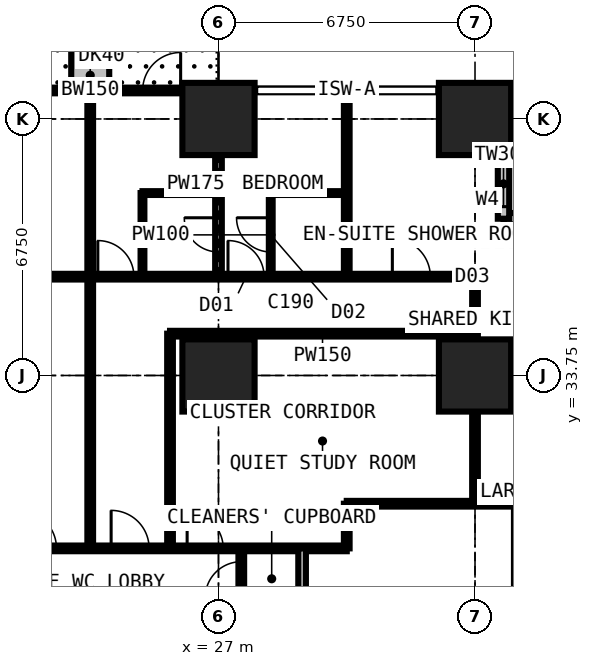
"""IFC4 building model, lengths in metres.
Left out: names, types, materials, properties, quantities, classifications, styles, units other than length and angle.
Written with IfcOpenShell. Run it as: python <this file> out.ifc"""

import sys

from ifc_helpers import new_model, si_unit, direction, frame, frame_2d, origin, origin_2d, place, context, subcontext, project, spatial, rectangle, extrude, element, fill, save


model = new_model("IFC4")
c1 = context("Model", 3, precision=1e-05, world=origin(), true_north=direction((0.0, 1.0)))
c2 = subcontext(c1, "Body", "Model", "MODEL_VIEW")
j1 = project(units=[si_unit("LENGTHUNIT", "METRE"), si_unit("PLANEANGLEUNIT", "RADIAN")], contexts=[c1])
p1 = place(None, origin())
s1 = spatial("IfcSite", under=j1, at=p1, CompositionType="ELEMENT")
p2 = place(p1, origin())
s2 = spatial("IfcBuilding", under=s1, at=p2, CompositionType="ELEMENT")
p3 = place(p2, frame((0.0, 0.0, 43.2)))
s3 = spatial("IfcBuildingStorey", under=s2, at=p3, CompositionType="ELEMENT", Elevation=43.2)
for number, where, z_axis, x_axis in (
    (1, (27.0, 33.75, 0.0), (0.0, 0.0, 1.0), (1.0, 0.0, 0.0)),
    (2, (27.0, 40.5, 0.0), (0.0, 0.0, 1.0), (1.0, 0.0, 0.0)),
    (3, (33.75, 33.75, 0.0), (0.0, 0.0, 1.0), (1.0, 0.0, 0.0)),
    (4, (33.75, 40.5, 0.0), (0.0, 0.0, 1.0), (1.0, 0.0, 0.0)),
):
    element("IfcColumn", number, at=place(p3, frame(where, z_axis=z_axis, x_axis=x_axis)), inside=s3, PredefinedType="COLUMN", context=c2, shape_type="SweptSolid", body=[
        extrude(rectangle(XDim=1.9, YDim=1.9, at=origin_2d()), origin(), (0.0, 0.0, 1.0), 3.6),
    ])
p4 = place(p3, frame((37.875, 37.875, 0.0), z_axis=(0.0, 0.0, 1.0), x_axis=(-1.0, 0.0, 0.0)))
e5 = element("IfcWall", 5, at=p4, inside=s3, PredefinedType="SOLIDWALL", context=c2, shape_type="SweptSolid", body=[
    extrude(rectangle(XDim=3.375, YDim=0.3, at=frame_2d((1.688, 0.0))), origin(), (0.0, 0.0, 1.0), 3.375),
])
p5 = place(p4, frame((0.788, 0.0, 0.6)))
e6 = element("IfcOpeningElement", 6, at=p5, cuts=e5, PredefinedType="OPENING", context=c2, shape_type="SweptSolid", body=[
    extrude(rectangle(XDim=1.8, YDim=2.1, at=frame_2d((0.9, 1.05))), frame((0.0, 0.16, 0.0), z_axis=(0.0, -1.0, 0.0), x_axis=(1.0, 0.0, 0.0)), (0.0, 0.0, 1.0), 0.32),
])
p6 = place(p3, frame((34.5, 37.875, 0.0), z_axis=(0.0, 0.0, 1.0), x_axis=(0.0, 1.0, 0.0)))
e7 = element("IfcWall", 7, at=p6, inside=s3, PredefinedType="SOLIDWALL", context=c2, shape_type="SweptSolid", body=[
    extrude(rectangle(XDim=3.375, YDim=0.3, at=frame_2d((1.688, 0.0))), origin(), (0.0, 0.0, 1.0), 3.375),
])
p7 = place(p6, frame((0.317, 0.0, 0.9)))
e8 = element("IfcOpeningElement", 8, at=p7, cuts=e7, PredefinedType="OPENING", context=c2, shape_type="SweptSolid", body=[
    extrude(rectangle(XDim=1.2, YDim=1.8, at=frame_2d((0.6, 0.9))), frame((0.0, 0.16, 0.0), z_axis=(0.0, -1.0, 0.0), x_axis=(1.0, 0.0, 0.0)), (0.0, 0.0, 1.0), 0.32),
])
p8 = place(p3, frame((20.25, 41.25, 0.0), z_axis=(0.0, 0.0, 1.0), x_axis=(1.0, 0.0, 0.0)))
e9 = element("IfcWall", 9, at=p8, inside=s3, PredefinedType="SOLIDWALL", context=c2, shape_type="SweptSolid", body=[
    extrude(rectangle(XDim=6.75, YDim=0.15, at=frame_2d((3.375, 0.0))), origin(), (0.0, 0.0, 1.0), 3.375),
])
p9 = place(p8, frame((0.996, 0.0, 0.0)))
e10 = element("IfcOpeningElement", 10, at=p9, cuts=e9, PredefinedType="OPENING", context=c2, shape_type="SweptSolid", body=[
    extrude(rectangle(XDim=1.0, YDim=2.2, at=frame_2d((0.5, 1.1))), frame((0.0, 0.085, 0.0), z_axis=(0.0, -1.0, 0.0), x_axis=(1.0, 0.0, 0.0)), (0.0, 0.0, 1.0), 0.17),
])
p10 = place(p8, frame((2.042, 0.0, 0.9)))
e11 = element("IfcOpeningElement", 11, at=p10, cuts=e9, PredefinedType="OPENING", context=c2, shape_type="SweptSolid", body=[
    extrude(rectangle(XDim=1.2, YDim=1.8, at=frame_2d((0.6, 0.9))), frame((0.0, 0.085, 0.0), z_axis=(0.0, -1.0, 0.0), x_axis=(1.0, 0.0, 0.0)), (0.0, 0.0, 1.0), 0.17),
])
p11 = place(p8, frame((4.754, 0.0, 0.0)))
e12 = element("IfcOpeningElement", 12, at=p11, cuts=e9, PredefinedType="OPENING", context=c2, shape_type="SweptSolid", body=[
    extrude(rectangle(XDim=1.0, YDim=2.2, at=frame_2d((0.5, 1.1))), frame((0.0, 0.085, 0.0), z_axis=(0.0, -1.0, 0.0), x_axis=(1.0, 0.0, 0.0)), (0.0, 0.0, 1.0), 0.17),
])
p12 = place(p8, frame((3.508, 0.0, 0.9)))
e13 = element("IfcOpeningElement", 13, at=p12, cuts=e9, PredefinedType="OPENING", context=c2, shape_type="SweptSolid", body=[
    extrude(rectangle(XDim=1.2, YDim=1.8, at=frame_2d((0.6, 0.9))), frame((0.0, 0.085, 0.0), z_axis=(0.0, -1.0, 0.0), x_axis=(1.0, 0.0, 0.0)), (0.0, 0.0, 1.0), 0.17),
])
p13 = place(p3, frame((23.625, 41.35, 0.0), z_axis=(0.0, 0.0, 1.0), x_axis=(0.0, 1.0, 0.0)))
e14 = element("IfcWall", 14, at=p13, inside=s3, PredefinedType="USERDEFINED", context=c2, shape_type="SweptSolid", body=[
    extrude(rectangle(XDim=2.2, YDim=1.0, at=frame_2d((1.1, 0.0))), origin(), (0.0, 0.0, 1.0), 0.9),
])
p14 = place(p3, frame((10.125, 36.35, 0.0), z_axis=(0.0, 0.0, 1.0), x_axis=(1.0, 0.0, 0.0)))
e15 = element("IfcWall", 15, at=p14, inside=s3, PredefinedType="PARTITIONING", context=c2, shape_type="SweptSolid", body=[
    extrude(rectangle(XDim=23.625, YDim=0.15, at=frame_2d((11.812, 0.0))), origin(), (0.0, 0.0, 1.0), 3.375),
])
p15 = place(p14, frame((21.45, 0.0, 0.0)))
e16 = element("IfcOpeningElement", 16, at=p15, cuts=e15, PredefinedType="OPENING", context=c2, shape_type="SweptSolid", body=[
    extrude(rectangle(XDim=1.0, YDim=2.2, at=frame_2d((0.5, 1.1))), frame((0.0, 0.085, 0.0), z_axis=(0.0, -1.0, 0.0), x_axis=(1.0, 0.0, 0.0)), (0.0, 0.0, 1.0), 0.17),
])
p16 = place(p14, frame((17.125, 0.0, 0.0)))
e17 = element("IfcOpeningElement", 17, at=p16, cuts=e15, PredefinedType="OPENING", context=c2, shape_type="SweptSolid", body=[
    extrude(rectangle(XDim=0.95, YDim=2.2, at=frame_2d((0.475, 1.1))), frame((0.0, 0.085, 0.0), z_axis=(0.0, -1.0, 0.0), x_axis=(1.0, 0.0, 0.0)), (0.0, 0.0, 1.0), 0.17),
])
p17 = place(p14, frame((13.7, 0.0, 0.0)))
e18 = element("IfcOpeningElement", 18, at=p17, cuts=e15, PredefinedType="OPENING", context=c2, shape_type="SweptSolid", body=[
    extrude(rectangle(XDim=0.95, YDim=2.2, at=frame_2d((0.475, 1.1))), frame((0.0, 0.085, 0.0), z_axis=(0.0, -1.0, 0.0), x_axis=(1.0, 0.0, 0.0)), (0.0, 0.0, 1.0), 0.17),
])
p18 = place(p14, frame((4.2, 0.0, 0.0)))
e19 = element("IfcOpeningElement", 19, at=p18, cuts=e15, PredefinedType="OPENING", context=c2, shape_type="SweptSolid", body=[
    extrude(rectangle(XDim=0.95, YDim=2.2, at=frame_2d((0.475, 1.1))), frame((0.0, 0.085, 0.0), z_axis=(0.0, -1.0, 0.0), x_axis=(1.0, 0.0, 0.0)), (0.0, 0.0, 1.0), 0.17),
])
p19 = place(p14, frame((10.95, 0.0, 0.0)))
e20 = element("IfcOpeningElement", 20, at=p19, cuts=e15, PredefinedType="OPENING", context=c2, shape_type="SweptSolid", body=[
    extrude(rectangle(XDim=0.95, YDim=2.2, at=frame_2d((0.475, 1.1))), frame((0.0, 0.085, 0.0), z_axis=(0.0, -1.0, 0.0), x_axis=(1.0, 0.0, 0.0)), (0.0, 0.0, 1.0), 0.17),
])
p20 = place(p3, frame((11.3, 29.2, 0.0), z_axis=(0.0, 0.0, 1.0), x_axis=(1.0, 0.0, 0.0)))
e21 = element("IfcWall", 21, at=p20, inside=s3, PredefinedType="PARTITIONING", context=c2, shape_type="SweptSolid", body=[
    extrude(rectangle(XDim=19.075, YDim=0.15, at=frame_2d((9.538, 0.0))), origin(), (0.0, 0.0, 1.0), 3.375),
])
p21 = place(p20, frame((12.875, 0.0, 0.0)))
e22 = element("IfcOpeningElement", 22, at=p21, cuts=e21, PredefinedType="OPENING", context=c2, shape_type="SweptSolid", body=[
    extrude(rectangle(XDim=1.0, YDim=2.2, at=frame_2d((0.5, 1.1))), frame((0.0, 0.085, 0.0), z_axis=(0.0, -1.0, 0.0), x_axis=(1.0, 0.0, 0.0)), (0.0, 0.0, 1.0), 0.17),
])
p22 = place(p20, frame((10.438, 0.0, 0.0)))
e23 = element("IfcOpeningElement", 23, at=p22, cuts=e21, PredefinedType="OPENING", context=c2, shape_type="SweptSolid", body=[
    extrude(rectangle(XDim=1.0, YDim=2.2, at=frame_2d((0.5, 1.1))), frame((0.0, 0.085, 0.0), z_axis=(0.0, -1.0, 0.0), x_axis=(1.0, 0.0, 0.0)), (0.0, 0.0, 1.0), 0.17),
])
p23 = place(p20, frame((14.875, 0.0, 0.0)))
e24 = element("IfcOpeningElement", 24, at=p23, cuts=e21, PredefinedType="OPENING", context=c2, shape_type="SweptSolid", body=[
    extrude(rectangle(XDim=0.95, YDim=2.2, at=frame_2d((0.475, 1.1))), frame((0.0, 0.085, 0.0), z_axis=(0.0, -1.0, 0.0), x_axis=(1.0, 0.0, 0.0)), (0.0, 0.0, 1.0), 0.17),
])
p24 = place(p3, frame((23.625, 29.2, 0.0), z_axis=(0.0, 0.0, 1.0), x_axis=(0.0, 1.0, 0.0)))
e25 = element("IfcWall", 25, at=p24, inside=s3, PredefinedType="PARTITIONING", context=c2, shape_type="SweptSolid", body=[
    extrude(rectangle(XDim=12.034, YDim=0.15, at=frame_2d((6.017, 0.0))), origin(), (0.0, 0.0, 1.0), 3.375),
])
p25 = place(p3, frame((25.0, 36.35, 0.0), z_axis=(0.0, 0.0, 1.0), x_axis=(0.0, 1.0, 0.0)))
e26 = element("IfcWall", 26, at=p25, inside=s3, PredefinedType="PARTITIONING", context=c2, shape_type="SweptSolid", body=[
    extrude(rectangle(XDim=2.2, YDim=0.1, at=frame_2d((1.1, 0.0))), origin(), (0.0, 0.0, 1.0), 3.375),
])
p26 = place(p3, frame((25.0, 38.55, 0.0), z_axis=(0.0, 0.0, 1.0), x_axis=(1.0, 0.0, 0.0)))
e27 = element("IfcWall", 27, at=p26, inside=s3, PredefinedType="PARTITIONING", context=c2, shape_type="SweptSolid", body=[
    extrude(rectangle(XDim=2.0, YDim=0.1, at=frame_2d((1.0, 0.0))), origin(), (0.0, 0.0, 1.0), 3.375),
])
p27 = place(p3, frame((25.725, 29.2, 0.0), z_axis=(0.0, 0.0, 1.0), x_axis=(0.0, 1.0, 0.0)))
e28 = element("IfcWall", 28, at=p27, inside=s3, PredefinedType="PARTITIONING", context=c2, shape_type="SweptSolid", body=[
    extrude(rectangle(XDim=5.65, YDim=0.15, at=frame_2d((2.825, 0.0))), origin(), (0.0, 0.0, 1.0), 3.375),
])
p28 = place(p3, frame((25.725, 34.85, 0.0), z_axis=(0.0, 0.0, 1.0), x_axis=(1.0, 0.0, 0.0)))
e29 = element("IfcWall", 29, at=p28, inside=s3, PredefinedType="PARTITIONING", context=c2, shape_type="SweptSolid", body=[
    extrude(rectangle(XDim=8.025, YDim=0.15, at=frame_2d((4.012, 0.0))), origin(), (0.0, 0.0, 1.0), 3.375),
])
p29 = place(p3, frame((27.0, 36.35, 0.0), z_axis=(0.0, 0.0, 1.0), x_axis=(0.0, 1.0, 0.0)))
e30 = element("IfcWall", 30, at=p29, inside=s3, PredefinedType="PARTITIONING", context=c2, shape_type="SweptSolid", body=[
    extrude(rectangle(XDim=4.884, YDim=0.175, at=frame_2d((2.442, 0.0))), origin(), (0.0, 0.0, 1.0), 2.61),
])
p30 = place(p29, frame((0.65, 0.0, 0.0)))
e31 = element("IfcOpeningElement", 31, at=p30, cuts=e30, PredefinedType="OPENING", context=c2, shape_type="SweptSolid", body=[
    extrude(rectangle(XDim=0.9, YDim=2.2, at=frame_2d((0.45, 1.1))), frame((0.0, 0.097, 0.0), z_axis=(0.0, -1.0, 0.0), x_axis=(1.0, 0.0, 0.0)), (0.0, 0.0, 1.0), 0.195),
])
p31 = place(p3, frame((27.6, 27.6, 0.0), z_axis=(0.0, 0.0, 1.0), x_axis=(0.0, 1.0, 0.0)))
e32 = element("IfcWall", 32, at=p31, inside=s3, PredefinedType="PARTITIONING", context=c2, shape_type="SweptSolid", body=[
    extrude(rectangle(XDim=1.6, YDim=0.15, at=frame_2d((0.8, 0.0))), origin(), (0.0, 0.0, 1.0), 3.375),
])
p32 = place(p31, frame((0.3, 0.0, 0.0)))
e33 = element("IfcOpeningElement", 33, at=p32, cuts=e32, PredefinedType="OPENING", context=c2, shape_type="SweptSolid", body=[
    extrude(rectangle(XDim=0.95, YDim=2.2, at=frame_2d((0.475, 1.1))), frame((0.0, 0.085, 0.0), z_axis=(0.0, -1.0, 0.0), x_axis=(1.0, 0.0, 0.0)), (0.0, 0.0, 1.0), 0.17),
])
p33 = place(p3, frame((28.375, 36.35, 0.0), z_axis=(0.0, 0.0, 1.0), x_axis=(0.0, 1.0, 0.0)))
e34 = element("IfcWall", 34, at=p33, inside=s3, PredefinedType="PARTITIONING", context=c2, shape_type="SweptSolid", body=[
    extrude(rectangle(XDim=2.2, YDim=0.1, at=frame_2d((1.1, 0.0))), origin(), (0.0, 0.0, 1.0), 3.375),
])
p34 = place(p33, frame((0.65, 0.0, 0.0)))
e35 = element("IfcOpeningElement", 35, at=p34, cuts=e34, PredefinedType="OPENING", context=c2, shape_type="SweptSolid", body=[
    extrude(rectangle(XDim=0.9, YDim=2.2, at=frame_2d((0.45, 1.1))), frame((0.0, 0.06, 0.0), z_axis=(0.0, -1.0, 0.0), x_axis=(1.0, 0.0, 0.0)), (0.0, 0.0, 1.0), 0.12),
])
p35 = place(p3, frame((28.375, 38.55, 0.0), z_axis=(0.0, 0.0, 1.0), x_axis=(1.0, 0.0, 0.0)))
e36 = element("IfcWall", 36, at=p35, inside=s3, PredefinedType="PARTITIONING", context=c2, shape_type="SweptSolid", body=[
    extrude(rectangle(XDim=2.0, YDim=0.1, at=frame_2d((1.0, 0.0))), origin(), (0.0, 0.0, 1.0), 3.375),
])
p36 = place(p3, frame((29.2, 11.3, 0.0), z_axis=(0.0, 0.0, 1.0), x_axis=(0.0, 1.0, 0.0)))
e37 = element("IfcWall", 37, at=p36, inside=s3, PredefinedType="PARTITIONING", context=c2, shape_type="SweptSolid", body=[
    extrude(rectangle(XDim=17.9, YDim=0.2, at=frame_2d((8.95, 0.0))), origin(), (0.0, 0.0, 1.0), 3.375),
])
p37 = place(p36, frame((8.35, 0.0, 0.0)))
e38 = element("IfcOpeningElement", 38, at=p37, cuts=e37, PredefinedType="OPENING", context=c2, shape_type="SweptSolid", body=[
    extrude(rectangle(XDim=1.2, YDim=2.2, at=frame_2d((0.6, 1.1))), frame((0.0, 0.11, 0.0), z_axis=(0.0, -1.0, 0.0), x_axis=(1.0, 0.0, 0.0)), (0.0, 0.0, 1.0), 0.22),
])
p38 = place(p3, frame((30.375, 29.2, 0.0), z_axis=(0.0, 0.0, 1.0), x_axis=(0.0, 1.0, 0.0)))
e39 = element("IfcWall", 39, at=p38, inside=s3, PredefinedType="PARTITIONING", context=c2, shape_type="SweptSolid", body=[
    extrude(rectangle(XDim=1.175, YDim=0.15, at=frame_2d((0.587, 0.0))), origin(), (0.0, 0.0, 1.0), 3.375),
])
p39 = place(p3, frame((30.375, 30.375, 0.0), z_axis=(0.0, 0.0, 1.0), x_axis=(1.0, 0.0, 0.0)))
e40 = element("IfcWall", 40, at=p39, inside=s3, PredefinedType="PARTITIONING", context=c2, shape_type="SweptSolid", body=[
    extrude(rectangle(XDim=10.859, YDim=0.15, at=frame_2d((5.429, 0.0))), origin(), (0.0, 0.0, 1.0), 3.375),
])
p40 = place(p3, frame((30.375, 36.35, 0.0), z_axis=(0.0, 0.0, 1.0), x_axis=(0.0, 1.0, 0.0)))
e41 = element("IfcWall", 41, at=p40, inside=s3, PredefinedType="PARTITIONING", context=c2, shape_type="SweptSolid", body=[
    extrude(rectangle(XDim=4.884, YDim=0.15, at=frame_2d((2.442, 0.0))), origin(), (0.0, 0.0, 1.0), 3.375),
])
p41 = place(p3, frame((33.75, 30.375, 0.0), z_axis=(0.0, 0.0, 1.0), x_axis=(0.0, 1.0, 0.0)))
e42 = element("IfcWall", 42, at=p41, inside=s3, PredefinedType="PARTITIONING", context=c2, shape_type="SweptSolid", body=[
    extrude(rectangle(XDim=5.975, YDim=0.15, at=frame_2d((2.988, 0.0))), origin(), (0.0, 0.0, 1.0), 2.877),
])
p42 = place(p7, origin())
e43 = element("IfcWindow", 43, at=p42, inside=s3, PartitioningType="SINGLE_PANEL", PredefinedType="WINDOW", context=c2, shape_type="SweptSolid", body=[
    extrude(rectangle(XDim=1.2, YDim=1.8, at=frame_2d((0.6, 0.9))), frame((0.0, 0.03, 0.0), z_axis=(0.0, -1.0, 0.0), x_axis=(1.0, 0.0, 0.0)), (0.0, 0.0, 1.0), 0.06),
])
fill(e8, e43)
p43 = place(p10, origin())
e44 = element("IfcWindow", 44, at=p43, inside=s3, PartitioningType="SINGLE_PANEL", PredefinedType="WINDOW", context=c2, shape_type="SweptSolid", body=[
    extrude(rectangle(XDim=1.2, YDim=1.8, at=frame_2d((0.6, 0.9))), frame((0.0, 0.03, 0.0), z_axis=(0.0, -1.0, 0.0), x_axis=(1.0, 0.0, 0.0)), (0.0, 0.0, 1.0), 0.06),
])
fill(e11, e44)
p44 = place(p11, origin())
e45 = element("IfcDoor", 45, at=p44, inside=s3, OperationType="SINGLE_SWING_RIGHT", PredefinedType="DOOR", context=c2, shape_type="SweptSolid", body=[
    extrude(rectangle(XDim=1.0, YDim=2.2, at=frame_2d((0.5, 1.1))), frame((0.0, 0.025, 0.0), z_axis=(0.0, -1.0, 0.0), x_axis=(1.0, 0.0, 0.0)), (0.0, 0.0, 1.0), 0.05),
])
fill(e12, e45)
p45 = place(p12, origin())
e46 = element("IfcWindow", 46, at=p45, inside=s3, PartitioningType="SINGLE_PANEL", PredefinedType="WINDOW", context=c2, shape_type="SweptSolid", body=[
    extrude(rectangle(XDim=1.2, YDim=1.8, at=frame_2d((0.6, 0.9))), frame((0.0, 0.03, 0.0), z_axis=(0.0, -1.0, 0.0), x_axis=(1.0, 0.0, 0.0)), (0.0, 0.0, 1.0), 0.06),
])
fill(e13, e46)
p46 = place(p32, origin())
e47 = element("IfcDoor", 47, at=p46, inside=s3, OperationType="SINGLE_SWING_LEFT", PredefinedType="DOOR", context=c2, shape_type="SweptSolid", body=[
    extrude(rectangle(XDim=0.95, YDim=2.2, at=frame_2d((0.475, 1.1))), frame((0.0, 0.025, 0.0), z_axis=(0.0, -1.0, 0.0), x_axis=(1.0, 0.0, 0.0)), (0.0, 0.0, 1.0), 0.05),
])
fill(e33, e47)
p47 = place(p15, origin())
e48 = element("IfcDoor", 48, at=p47, inside=s3, OperationType="SINGLE_SWING_LEFT", PredefinedType="DOOR", context=c2, shape_type="SweptSolid", body=[
    extrude(rectangle(XDim=1.0, YDim=2.2, at=frame_2d((0.5, 1.1))), frame((0.0, 0.025, 0.0), z_axis=(0.0, -1.0, 0.0), x_axis=(1.0, 0.0, 0.0)), (0.0, 0.0, 1.0), 0.05),
])
fill(e16, e48)
p48 = place(p16, origin())
e49 = element("IfcDoor", 49, at=p48, inside=s3, OperationType="SINGLE_SWING_LEFT", PredefinedType="DOOR", context=c2, shape_type="SweptSolid", body=[
    extrude(rectangle(XDim=0.95, YDim=2.2, at=frame_2d((0.475, 1.1))), frame((0.0, 0.025, 0.0), z_axis=(0.0, -1.0, 0.0), x_axis=(1.0, 0.0, 0.0)), (0.0, 0.0, 1.0), 0.05),
])
fill(e17, e49)
p49 = place(p34, origin())
e50 = element("IfcDoor", 50, at=p49, inside=s3, OperationType="SINGLE_SWING_RIGHT", PredefinedType="DOOR", context=c2, shape_type="SweptSolid", body=[
    extrude(rectangle(XDim=0.9, YDim=2.2, at=frame_2d((0.45, 1.1))), frame((0.0, 0.025, 0.0), z_axis=(0.0, -1.0, 0.0), x_axis=(1.0, 0.0, 0.0)), (0.0, 0.0, 1.0), 0.05),
])
fill(e35, e50)
p50 = place(p17, origin())
e51 = element("IfcDoor", 51, at=p50, inside=s3, OperationType="SINGLE_SWING_LEFT", PredefinedType="DOOR", context=c2, shape_type="SweptSolid", body=[
    extrude(rectangle(XDim=0.95, YDim=2.2, at=frame_2d((0.475, 1.1))), frame((0.0, 0.025, 0.0), z_axis=(0.0, -1.0, 0.0), x_axis=(1.0, 0.0, 0.0)), (0.0, 0.0, 1.0), 0.05),
])
fill(e18, e51)
p51 = place(p30, origin())
e52 = element("IfcDoor", 52, at=p51, inside=s3, OperationType="SINGLE_SWING_RIGHT", PredefinedType="DOOR", context=c2, shape_type="SweptSolid", body=[
    extrude(rectangle(XDim=0.9, YDim=2.2, at=frame_2d((0.45, 1.1))), frame((0.0, 0.025, 0.0), z_axis=(0.0, -1.0, 0.0), x_axis=(1.0, 0.0, 0.0)), (0.0, 0.0, 1.0), 0.05),
])
fill(e31, e52)
p52 = place(p21, origin())
e53 = element("IfcDoor", 53, at=p52, inside=s3, OperationType="SINGLE_SWING_LEFT", PredefinedType="DOOR", context=c2, shape_type="SweptSolid", body=[
    extrude(rectangle(XDim=1.0, YDim=2.2, at=frame_2d((0.5, 1.1))), frame((0.0, 0.025, 0.0), z_axis=(0.0, -1.0, 0.0), x_axis=(1.0, 0.0, 0.0)), (0.0, 0.0, 1.0), 0.05),
])
fill(e22, e53)
p53 = place(p22, origin())
e54 = element("IfcDoor", 54, at=p53, inside=s3, OperationType="SINGLE_SWING_LEFT", PredefinedType="DOOR", context=c2, shape_type="SweptSolid", body=[
    extrude(rectangle(XDim=1.0, YDim=2.2, at=frame_2d((0.5, 1.1))), frame((0.0, 0.025, 0.0), z_axis=(0.0, -1.0, 0.0), x_axis=(1.0, 0.0, 0.0)), (0.0, 0.0, 1.0), 0.05),
])
fill(e23, e54)
p54 = place(p23, origin())
e55 = element("IfcDoor", 55, at=p54, inside=s3, OperationType="SINGLE_SWING_LEFT", PredefinedType="DOOR", context=c2, shape_type="SweptSolid", body=[
    extrude(rectangle(XDim=0.95, YDim=2.2, at=frame_2d((0.475, 1.1))), frame((0.0, 0.025, 0.0), z_axis=(0.0, -1.0, 0.0), x_axis=(1.0, 0.0, 0.0)), (0.0, 0.0, 1.0), 0.05),
])
fill(e24, e55)
save(model, sys.argv[1])
